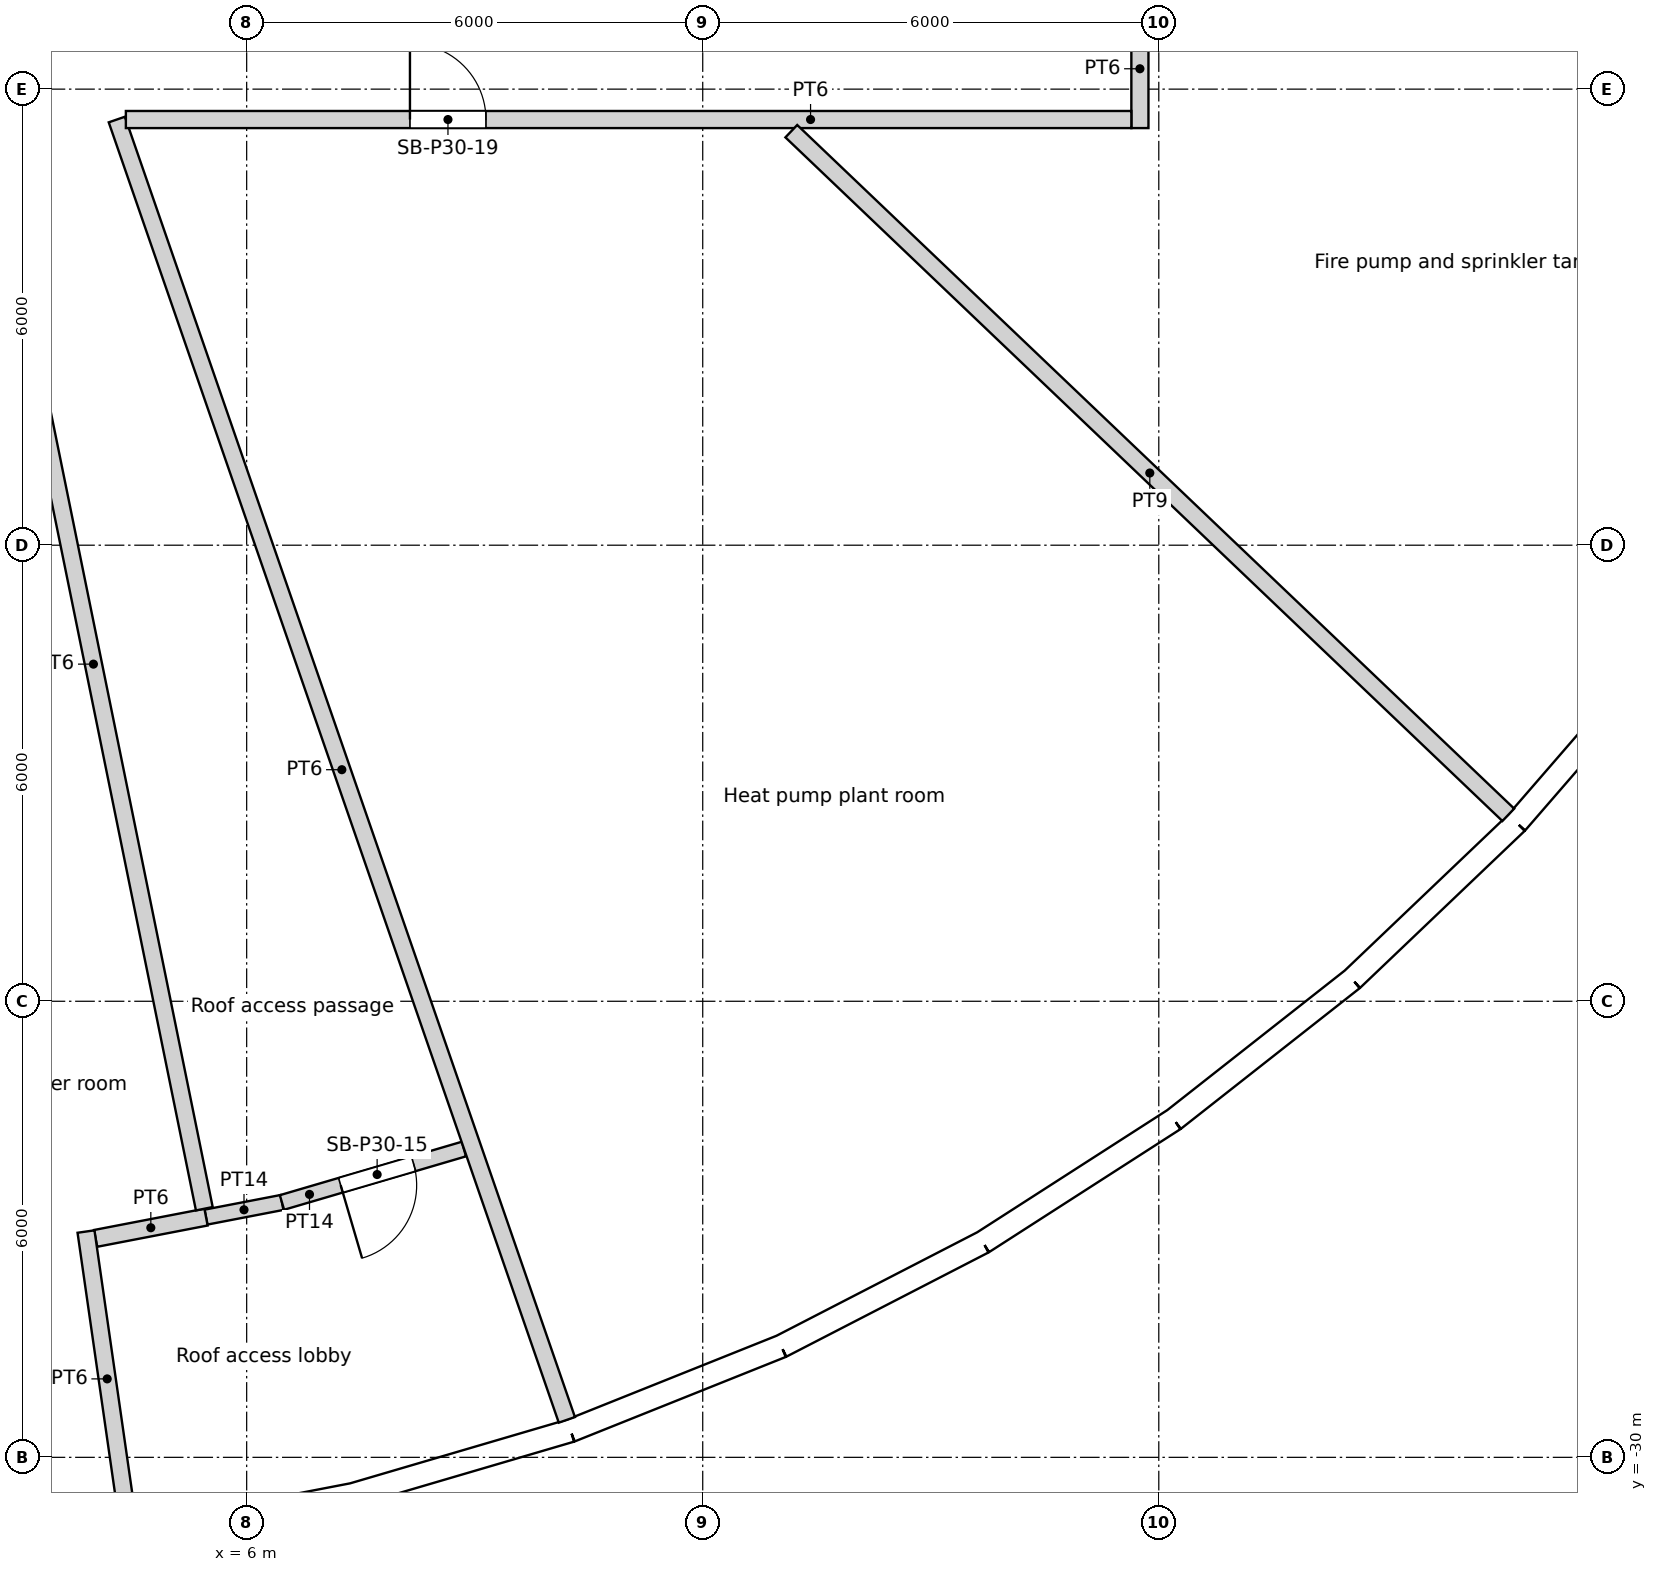
"""IFC4 building model, lengths in metres.
Left out: names, types, materials, properties, quantities, classifications, styles, units other than length and angle.
Written with IfcOpenShell. Run it as: python <this file> out.ifc"""

import sys

from ifc_helpers import new_model, si_unit, direction, frame, frame_2d, origin, origin_2d, place, context, subcontext, project, spatial, rectangle, circle, extrude, element, fill, save


model = new_model("IFC4")
c1 = context("Model", 3, precision=1e-05, world=origin(), true_north=direction((0.0, 1.0)))
c2 = subcontext(c1, "Body", "Model", "MODEL_VIEW")
j1 = project(units=[si_unit("LENGTHUNIT", "METRE"), si_unit("PLANEANGLEUNIT", "RADIAN")], contexts=[c1])
p1 = place(None, origin())
s1 = spatial("IfcSite", under=j1, at=p1, CompositionType="ELEMENT")
p2 = place(p1, origin())
s2 = spatial("IfcBuilding", under=s1, at=p2, CompositionType="ELEMENT")
p3 = place(p2, frame((0.0, 0.0, 120.0)))
s3 = spatial("IfcBuildingStorey", under=s2, at=p3, CompositionType="ELEMENT", Elevation=120.0)
for number, where, z_axis, x_axis in (
    (1, (7.137, -29.421, 0.0), (0.0, 0.0, 1.0), (1.0, 0.0, 0.0)),
    (2, (12.576, -27.539, 0.0), (0.0, 0.0, 1.0), (1.0, 0.0, 0.0)),
    (3, (17.561, -24.661, 0.0), (0.0, 0.0, 1.0), (1.0, 0.0, 0.0)),
    (4, (21.911, -20.892, 0.0), (0.0, 0.0, 1.0), (1.0, 0.0, 0.0)),
):
    element("IfcColumn", number, at=place(p3, frame(where, z_axis=z_axis, x_axis=x_axis)), inside=s3, PredefinedType="COLUMN", context=c2, shape_type="SweptSolid", body=[
        extrude(circle(Radius=0.6, at=origin_2d()), origin(), (0.0, 0.0, 1.0), 6.0),
    ])
for number, where, z_axis, x_axis in (
    (5, (4.263, -24.175, 0.0), (0.0, 0.0, 1.0), (1.0, 0.0, 0.0)),
    (6, (9.723, -22.54, 0.0), (0.0, 0.0, 1.0), (1.0, 0.0, 0.0)),
    (7, (14.659, -19.69, 0.0), (0.0, 0.0, 1.0), (1.0, 0.0, 0.0)),
    (8, (18.805, -15.779, 0.0), (0.0, 0.0, 1.0), (1.0, 0.0, 0.0)),
    (9, (21.937, -11.017, 0.0), (0.0, 0.0, 1.0), (1.0, 0.0, 0.0)),
):
    element("IfcColumn", number, at=place(p3, frame(where, z_axis=z_axis, x_axis=x_axis)), inside=s3, PredefinedType="COLUMN", context=c2, shape_type="SweptSolid", body=[
        extrude(circle(Radius=0.65, at=origin_2d()), origin(), (0.0, 0.0, 1.0), 6.0),
    ])
for number, where, z_axis, x_axis in (
    (10, (6.876, -17.521, 0.0), (0.0, 0.0, 1.0), (1.0, 0.0, 0.0)),
    (11, (11.735, -14.716, 0.0), (0.0, 0.0, 1.0), (1.0, 0.0, 0.0)),
):
    element("IfcColumn", number, at=place(p3, frame(where, z_axis=z_axis, x_axis=x_axis)), inside=s3, PredefinedType="COLUMN", context=c2, shape_type="SweptSolid", body=[
        extrude(circle(Radius=0.7, at=origin_2d()), origin(), (0.0, 0.0, 1.0), 6.0),
    ])
p4 = place(p3, frame((4.465, -31.055, 0.0), z_axis=(0.0, 0.0, 1.0), x_axis=(0.981918853666, 0.189302310646, 0.0)))
e12 = element("IfcWall", 12, at=p4, inside=s3, PredefinedType="SOLIDWALL", context=c2, shape_type="SweptSolid", body=[
    extrude(rectangle(XDim=2.986, YDim=0.3, at=frame_2d((1.493, 0.0))), origin(), (0.0, 0.0, 1.0), 5.7),
])
p5 = place(p4, frame((1.493, 0.0, 1.8)))
e13 = element("IfcOpeningElement", 13, at=p5, cuts=e12, PredefinedType="OPENING", context=c2, shape_type="SweptSolid", body=[
    extrude(circle(Radius=1.2, at=origin_2d()), frame((0.0, 0.16, 0.0), z_axis=(0.0, -1.0, 0.0), x_axis=(1.0, 0.0, 0.0)), (0.0, 0.0, 1.0), 0.32),
])
p6 = place(p3, frame((7.397, -30.49, 0.0), z_axis=(0.0, 0.0, 1.0), x_axis=(0.959502108153, 0.281701445593, 0.0)))
e14 = element("IfcWall", 14, at=p6, inside=s3, PredefinedType="SOLIDWALL", context=c2, shape_type="SweptSolid", body=[
    extrude(rectangle(XDim=2.986, YDim=0.3, at=frame_2d((1.493, 0.0))), origin(), (0.0, 0.0, 1.0), 5.7),
])
p7 = place(p6, frame((1.493, 0.0, 1.8)))
e15 = element("IfcOpeningElement", 15, at=p7, cuts=e14, PredefinedType="OPENING", context=c2, shape_type="SweptSolid", body=[
    extrude(circle(Radius=1.2, at=origin_2d()), frame((0.0, 0.16, 0.0), z_axis=(0.0, -1.0, 0.0), x_axis=(1.0, 0.0, 0.0)), (0.0, 0.0, 1.0), 0.32),
])
p8 = place(p3, frame((10.261, -29.649, 0.0), z_axis=(0.0, 0.0, 1.0), x_axis=(0.928380795373, 0.371630325434, 0.0)))
e16 = element("IfcWall", 16, at=p8, inside=s3, PredefinedType="SOLIDWALL", context=c2, shape_type="SweptSolid", body=[
    extrude(rectangle(XDim=2.986, YDim=0.3, at=frame_2d((1.493, 0.0))), origin(), (0.0, 0.0, 1.0), 5.7),
])
p9 = place(p8, frame((1.493, 0.0, 1.8)))
e17 = element("IfcOpeningElement", 17, at=p9, cuts=e16, PredefinedType="OPENING", context=c2, shape_type="SweptSolid", body=[
    extrude(circle(Radius=1.2, at=origin_2d()), frame((0.0, 0.16, 0.0), z_axis=(0.0, -1.0, 0.0), x_axis=(1.0, 0.0, 0.0)), (0.0, 0.0, 1.0), 0.32),
])
p10 = place(p3, frame((13.033, -28.539, 0.0), z_axis=(0.0, 0.0, 1.0), x_axis=(0.888831268481, 0.458234630043, 0.0)))
e18 = element("IfcWall", 18, at=p10, inside=s3, PredefinedType="SOLIDWALL", context=c2, shape_type="SweptSolid", body=[
    extrude(rectangle(XDim=2.986, YDim=0.3, at=frame_2d((1.493, 0.0))), origin(), (0.0, 0.0, 1.0), 5.7),
])
p11 = place(p10, frame((1.493, 0.0, 1.8)))
e19 = element("IfcOpeningElement", 19, at=p11, cuts=e18, PredefinedType="OPENING", context=c2, shape_type="SweptSolid", body=[
    extrude(circle(Radius=1.2, at=origin_2d()), frame((0.0, 0.16, 0.0), z_axis=(0.0, -1.0, 0.0), x_axis=(1.0, 0.0, 0.0)), (0.0, 0.0, 1.0), 0.32),
])
p12 = place(p3, frame((15.687, -27.171, 0.0), z_axis=(0.0, 0.0, 1.0), x_axis=(0.841242231846, 0.540658401727, 0.0)))
e20 = element("IfcWall", 20, at=p12, inside=s3, PredefinedType="SOLIDWALL", context=c2, shape_type="SweptSolid", body=[
    extrude(rectangle(XDim=2.986, YDim=0.3, at=frame_2d((1.493, 0.0))), origin(), (0.0, 0.0, 1.0), 5.7),
])
p13 = place(p12, frame((1.493, 0.0, 1.8)))
e21 = element("IfcOpeningElement", 21, at=p13, cuts=e20, PredefinedType="OPENING", context=c2, shape_type="SweptSolid", body=[
    extrude(circle(Radius=1.2, at=origin_2d()), frame((0.0, 0.16, 0.0), z_axis=(0.0, -1.0, 0.0), x_axis=(1.0, 0.0, 0.0)), (0.0, 0.0, 1.0), 0.32),
])
p14 = place(p3, frame((18.199, -25.557, 0.0), z_axis=(0.0, 0.0, 1.0), x_axis=(0.786043032847, 0.618171780747, 0.0)))
e22 = element("IfcWall", 22, at=p14, inside=s3, PredefinedType="SOLIDWALL", context=c2, shape_type="SweptSolid", body=[
    extrude(rectangle(XDim=2.986, YDim=0.3, at=frame_2d((1.493, 0.0))), origin(), (0.0, 0.0, 1.0), 5.7),
])
p15 = place(p14, frame((1.493, 0.0, 1.8)))
e23 = element("IfcOpeningElement", 23, at=p15, cuts=e22, PredefinedType="OPENING", context=c2, shape_type="SweptSolid", body=[
    extrude(circle(Radius=1.2, at=origin_2d()), frame((0.0, 0.16, 0.0), z_axis=(0.0, -1.0, 0.0), x_axis=(1.0, 0.0, 0.0)), (0.0, 0.0, 1.0), 0.32),
])
p16 = place(p3, frame((20.546, -23.711, 0.0), z_axis=(0.0, 0.0, 1.0), x_axis=(0.723750841228, 0.690061388444, 0.0)))
e24 = element("IfcWall", 24, at=p16, inside=s3, PredefinedType="SOLIDWALL", context=c2, shape_type="SweptSolid", body=[
    extrude(rectangle(XDim=2.986, YDim=0.3, at=frame_2d((1.493, 0.0))), origin(), (0.0, 0.0, 1.0), 5.7),
])
p17 = place(p16, frame((1.493, 0.0, 1.8)))
e25 = element("IfcOpeningElement", 25, at=p17, cuts=e24, PredefinedType="OPENING", context=c2, shape_type="SweptSolid", body=[
    extrude(circle(Radius=1.2, at=origin_2d()), frame((0.0, 0.16, 0.0), z_axis=(0.0, -1.0, 0.0), x_axis=(1.0, 0.0, 0.0)), (0.0, 0.0, 1.0), 0.32),
])
p18 = place(p3, frame((22.707, -21.651, 0.0), z_axis=(0.0, 0.0, 1.0), x_axis=(0.654809121128, 0.755794294029, 0.0)))
e26 = element("IfcWall", 26, at=p18, inside=s3, PredefinedType="SOLIDWALL", context=c2, shape_type="SweptSolid", body=[
    extrude(rectangle(XDim=2.986, YDim=0.3, at=frame_2d((1.493, 0.0))), origin(), (0.0, 0.0, 1.0), 5.7),
])
p19 = place(p18, frame((1.493, 0.0, 1.8)))
e27 = element("IfcOpeningElement", 27, at=p19, cuts=e26, PredefinedType="OPENING", context=c2, shape_type="SweptSolid", body=[
    extrude(circle(Radius=1.2, at=origin_2d()), frame((0.0, 0.16, 0.0), z_axis=(0.0, -1.0, 0.0), x_axis=(1.0, 0.0, 0.0)), (0.0, 0.0, 1.0), 0.32),
])
p20 = place(p3, frame((4.013, -27.12, 0.0), z_axis=(0.0, 0.0, 1.0), x_axis=(0.981915682772, 0.189318757462, 0.0)))
e28 = element("IfcWall", 28, at=p20, inside=s3, PredefinedType="PARTITIONING", context=c2, shape_type="SweptSolid", body=[
    extrude(rectangle(XDim=1.479, YDim=0.225, at=frame_2d((0.74, 0.0))), origin(), (0.0, 0.0, 1.0), 5.2),
])
p21 = place(p3, frame((4.411, -12.4, 0.0), z_axis=(0.0, 0.0, 1.0), x_axis=(1.0, 0.0, 0.0)))
e29 = element("IfcWall", 29, at=p21, inside=s3, PredefinedType="PARTITIONING", context=c2, shape_type="SweptSolid", body=[
    extrude(rectangle(XDim=13.229, YDim=0.225, at=frame_2d((6.614, 0.0))), origin(), (0.0, 0.0, 1.0), 5.2),
])
p22 = place(p21, frame((3.738, 0.0, 0.0)))
e30 = element("IfcOpeningElement", 30, at=p22, cuts=e29, PredefinedType="OPENING", context=c2, shape_type="SweptSolid", body=[
    extrude(rectangle(XDim=1.0, YDim=2.1, at=frame_2d((0.5, 1.05))), frame((0.0, 0.113, 0.0), z_axis=(0.0, -1.0, 0.0), x_axis=(1.0, 0.0, 0.0)), (0.0, 0.0, 1.0), 0.225),
])
p23 = place(p3, frame((4.444, -30.906, 0.0), z_axis=(0.0, 0.0, 1.0), x_axis=(-0.142302666682, 0.989823191815, 0.0)))
e31 = element("IfcWall", 31, at=p23, inside=s3, PredefinedType="PARTITIONING", context=c2, shape_type="SweptSolid", body=[
    extrude(rectangle(XDim=3.917, YDim=0.225, at=frame_2d((1.958, 0.0))), origin(), (0.0, 0.0, 1.0), 5.2),
])
p24 = place(p3, frame((5.443, -26.729, 0.0), z_axis=(0.0, 0.0, 1.0), x_axis=(-0.199537394252, 0.979890212368, 0.0)))
e32 = element("IfcWall", 32, at=p24, inside=s3, PredefinedType="PARTITIONING", context=c2, shape_type="SweptSolid", body=[
    extrude(rectangle(XDim=14.624, YDim=0.225, at=frame_2d((7.312, 0.0))), origin(), (0.0, 0.0, 1.0), 5.2),
])
p25 = place(p3, frame((5.465, -26.84, 0.0), z_axis=(0.0, 0.0, 1.0), x_axis=(0.981931096213, 0.189238796999, 0.0)))
e33 = element("IfcWall", 33, at=p25, inside=s3, PredefinedType="PARTITIONING", context=c2, shape_type="SweptSolid", body=[
    extrude(rectangle(XDim=1.018, YDim=0.2, at=frame_2d((0.509, 0.0))), origin(), (0.0, 0.0, 1.0), 5.2),
])
p26 = place(p3, frame((8.858, -25.944, 0.0), z_axis=(0.0, 0.0, 1.0), x_axis=(-0.959504098974, -0.281694664577, 0.0)))
e34 = element("IfcWall", 34, at=p26, inside=s3, PredefinedType="PARTITIONING", context=c2, shape_type="SweptSolid", body=[
    extrude(rectangle(XDim=2.494, YDim=0.2, at=frame_2d((1.247, 0.0))), origin(), (0.0, 0.0, 1.0), 5.2),
])
p27 = place(p26, frame((0.69, 0.0, 0.0)))
e35 = element("IfcOpeningElement", 35, at=p27, cuts=e34, PredefinedType="OPENING", context=c2, shape_type="SweptSolid", body=[
    extrude(rectangle(XDim=1.0, YDim=2.1, at=frame_2d((0.5, 1.05))), frame((0.0, 0.1, 0.0), z_axis=(0.0, -1.0, 0.0), x_axis=(1.0, 0.0, 0.0)), (0.0, 0.0, 1.0), 0.2),
])
p28 = place(p3, frame((10.212, -29.507, 0.0), z_axis=(0.0, 0.0, 1.0), x_axis=(-0.327058221259, 0.945004190418, 0.0)))
e36 = element("IfcWall", 36, at=p28, inside=s3, PredefinedType="PARTITIONING", context=c2, shape_type="SweptSolid", body=[
    extrude(rectangle(XDim=18.103, YDim=0.225, at=frame_2d((9.051, 0.0))), origin(), (0.0, 0.0, 1.0), 5.2),
])
p29 = place(p3, frame((17.752, -12.512, 0.0), z_axis=(0.0, 0.0, 1.0), x_axis=(0.0, 1.0, 0.0)))
e37 = element("IfcWall", 37, at=p29, inside=s3, PredefinedType="PARTITIONING", context=c2, shape_type="SweptSolid", body=[
    extrude(rectangle(XDim=3.997, YDim=0.225, at=frame_2d((1.999, 0.0))), origin(), (0.0, 0.0, 1.0), 5.2),
])
p30 = place(p29, frame((1.611, 0.0, 0.0)))
e38 = element("IfcOpeningElement", 38, at=p30, cuts=e37, PredefinedType="OPENING", context=c2, shape_type="SweptSolid", body=[
    extrude(rectangle(XDim=1.0, YDim=2.1, at=frame_2d((0.5, 1.05))), frame((0.0, 0.113, 0.0), z_axis=(0.0, -1.0, 0.0), x_axis=(1.0, 0.0, 0.0)), (0.0, 0.0, 1.0), 0.225),
])
p31 = place(p3, frame((22.598, -21.547, 0.0), z_axis=(0.0, 0.0, 1.0), x_axis=(-0.72374624757, 0.690066206337, 0.0)))
e39 = element("IfcWall", 39, at=p31, inside=s3, PredefinedType="PARTITIONING", context=c2, shape_type="SweptSolid", body=[
    extrude(rectangle(XDim=13.033, YDim=0.225, at=frame_2d((6.517, 0.0))), origin(), (0.0, 0.0, 1.0), 2.7),
])
p32 = place(p3, frame((28.988, -11.605, 0.0), z_axis=(0.0, 0.0, 1.0), x_axis=(-0.928362433176, 0.371676193303, 0.0)))
e40 = element("IfcWall", 40, at=p32, inside=s3, PredefinedType="PARTITIONING", context=c2, shape_type="SweptSolid", body=[
    extrude(rectangle(XDim=13.415, YDim=0.225, at=frame_2d((6.708, 0.0))), origin(), (0.0, 0.0, 1.0), 5.2),
])
p33 = place(p5, origin())
e41 = element("IfcWindow", 41, at=p33, inside=s3, PartitioningType="SINGLE_PANEL", PredefinedType="WINDOW", context=c2, shape_type="SweptSolid", body=[
    extrude(circle(Radius=1.2, at=origin_2d()), frame((0.0, 0.12, 0.0), z_axis=(0.0, -1.0, 0.0), x_axis=(1.0, 0.0, 0.0)), (0.0, 0.0, 1.0), 0.1),
])
fill(e13, e41)
p34 = place(p7, origin())
e42 = element("IfcWindow", 42, at=p34, inside=s3, PartitioningType="SINGLE_PANEL", PredefinedType="WINDOW", context=c2, shape_type="SweptSolid", body=[
    extrude(circle(Radius=1.2, at=origin_2d()), frame((0.0, 0.12, 0.0), z_axis=(0.0, -1.0, 0.0), x_axis=(1.0, 0.0, 0.0)), (0.0, 0.0, 1.0), 0.1),
])
fill(e15, e42)
p35 = place(p9, origin())
e43 = element("IfcWindow", 43, at=p35, inside=s3, PartitioningType="SINGLE_PANEL", PredefinedType="WINDOW", context=c2, shape_type="SweptSolid", body=[
    extrude(circle(Radius=1.2, at=origin_2d()), frame((0.0, 0.12, 0.0), z_axis=(0.0, -1.0, 0.0), x_axis=(1.0, 0.0, 0.0)), (0.0, 0.0, 1.0), 0.1),
])
fill(e17, e43)
p36 = place(p11, origin())
e44 = element("IfcWindow", 44, at=p36, inside=s3, PartitioningType="SINGLE_PANEL", PredefinedType="WINDOW", context=c2, shape_type="SweptSolid", body=[
    extrude(circle(Radius=1.2, at=origin_2d()), frame((0.0, 0.12, 0.0), z_axis=(0.0, -1.0, 0.0), x_axis=(1.0, 0.0, 0.0)), (0.0, 0.0, 1.0), 0.1),
])
fill(e19, e44)
p37 = place(p13, origin())
e45 = element("IfcWindow", 45, at=p37, inside=s3, PartitioningType="SINGLE_PANEL", PredefinedType="WINDOW", context=c2, shape_type="SweptSolid", body=[
    extrude(circle(Radius=1.2, at=origin_2d()), frame((0.0, 0.12, 0.0), z_axis=(0.0, -1.0, 0.0), x_axis=(1.0, 0.0, 0.0)), (0.0, 0.0, 1.0), 0.1),
])
fill(e21, e45)
p38 = place(p15, origin())
e46 = element("IfcWindow", 46, at=p38, inside=s3, PartitioningType="SINGLE_PANEL", PredefinedType="WINDOW", context=c2, shape_type="SweptSolid", body=[
    extrude(circle(Radius=1.2, at=origin_2d()), frame((0.0, 0.12, 0.0), z_axis=(0.0, -1.0, 0.0), x_axis=(1.0, 0.0, 0.0)), (0.0, 0.0, 1.0), 0.1),
])
fill(e23, e46)
p39 = place(p17, origin())
e47 = element("IfcWindow", 47, at=p39, inside=s3, PartitioningType="SINGLE_PANEL", PredefinedType="WINDOW", context=c2, shape_type="SweptSolid", body=[
    extrude(circle(Radius=1.2, at=origin_2d()), frame((0.0, 0.12, 0.0), z_axis=(0.0, -1.0, 0.0), x_axis=(1.0, 0.0, 0.0)), (0.0, 0.0, 1.0), 0.1),
])
fill(e25, e47)
p40 = place(p19, origin())
e48 = element("IfcWindow", 48, at=p40, inside=s3, PartitioningType="SINGLE_PANEL", PredefinedType="WINDOW", context=c2, shape_type="SweptSolid", body=[
    extrude(circle(Radius=1.2, at=origin_2d()), frame((0.0, 0.12, 0.0), z_axis=(0.0, -1.0, 0.0), x_axis=(1.0, 0.0, 0.0)), (0.0, 0.0, 1.0), 0.1),
])
fill(e27, e48)
p41 = place(p27, origin())
e49 = element("IfcDoor", 49, at=p41, inside=s3, OperationType="SINGLE_SWING_RIGHT", PredefinedType="DOOR", context=c2, shape_type="SweptSolid", body=[
    extrude(rectangle(XDim=1.0, YDim=2.1, at=frame_2d((0.5, 1.05))), frame((0.0, 0.025, 0.0), z_axis=(0.0, -1.0, 0.0), x_axis=(1.0, 0.0, 0.0)), (0.0, 0.0, 1.0), 0.05),
])
fill(e35, e49)
p42 = place(p22, origin())
e50 = element("IfcDoor", 50, at=p42, inside=s3, OperationType="SINGLE_SWING_LEFT", PredefinedType="DOOR", context=c2, shape_type="SweptSolid", body=[
    extrude(rectangle(XDim=1.0, YDim=2.1, at=frame_2d((0.5, 1.05))), frame((0.0, 0.025, 0.0), z_axis=(0.0, -1.0, 0.0), x_axis=(1.0, 0.0, 0.0)), (0.0, 0.0, 1.0), 0.05),
])
fill(e30, e50)
save(model, sys.argv[1])
